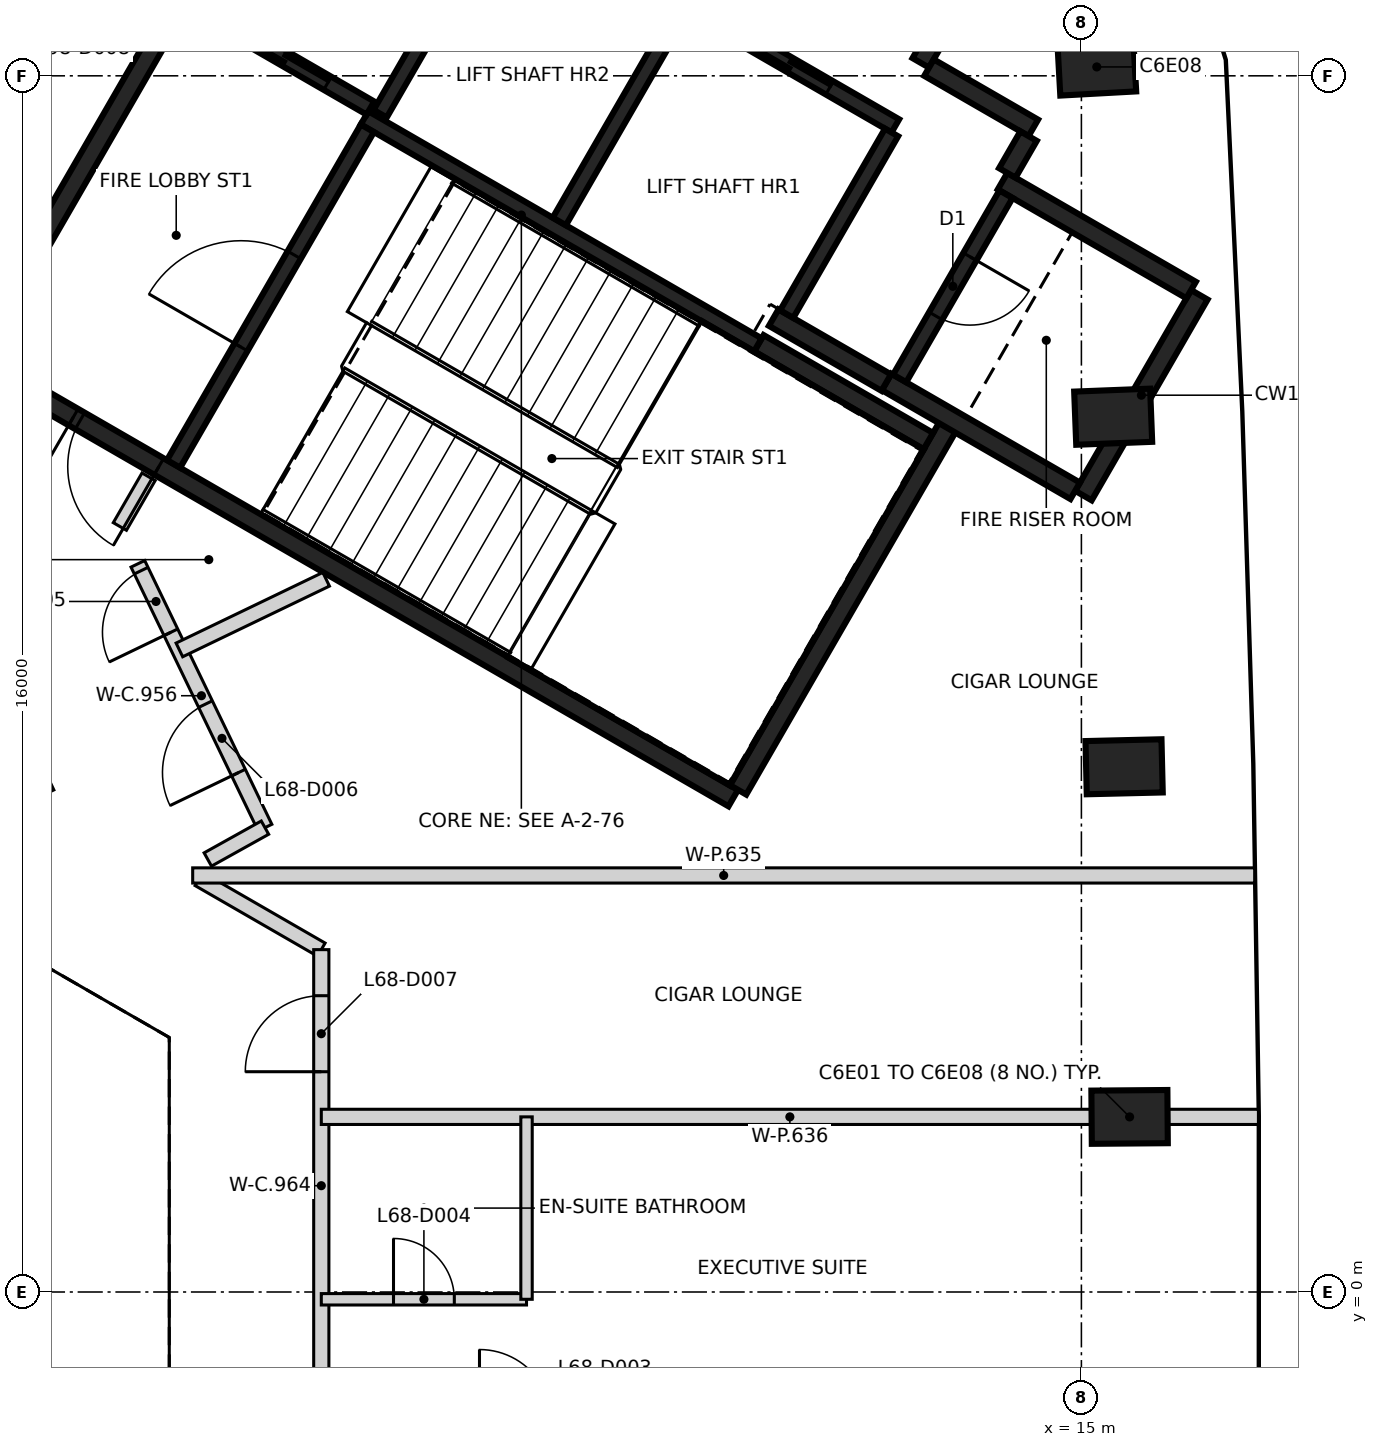
"""IFC4 building model, lengths in metres.
Left out: names, types, materials, properties, quantities, classifications, styles, units other than length and angle.
Written with IfcOpenShell. Run it as: python <this file> out.ifc"""

import sys

from ifc_helpers import new_model, si_unit, direction, frame, frame_2d, origin, origin_2d, place, context, subcontext, project, spatial, rectangle, extrude, element, fill, save


model = new_model("IFC4")
c1 = context("Model", 3, precision=1e-05, world=origin(), true_north=direction((0.0, 1.0)))
c2 = subcontext(c1, "Body", "Model", "MODEL_VIEW")
j1 = project(units=[si_unit("LENGTHUNIT", "METRE"), si_unit("PLANEANGLEUNIT", "RADIAN")], contexts=[c1])
p1 = place(None, origin())
s1 = spatial("IfcSite", under=j1, at=p1, CompositionType="ELEMENT")
p2 = place(p1, origin())
s2 = spatial("IfcBuilding", under=s1, at=p2, CompositionType="ELEMENT")
p3 = place(p2, frame((0.0, 0.0, 269.4)))
s3 = spatial("IfcBuildingStorey", under=s2, at=p3, CompositionType="ELEMENT", Elevation=269.4)
for number, where, z_axis, x_axis in (
    (1, (15.634, 2.303, -0.35), (0.0, 0.0, 1.0), (1.0, 0.008, 0.0)),
    (2, (15.562, 6.91, -0.35), (0.0, 0.0, 1.0), (1.0, 0.024, 0.0)),
    (3, (15.418, 11.515, -0.35), (0.0, 0.0, 1.0), (0.999, 0.039, 0.0)),
    (4, (15.202, 16.117, -0.35), (0.0, 0.0, 1.0), (0.998, 0.055, 0.0)),
):
    element("IfcColumn", number, at=place(p3, frame(where, z_axis=z_axis, x_axis=x_axis)), inside=s3, PredefinedType="COLUMN", context=c2, shape_type="SweptSolid", body=[
        extrude(rectangle(XDim=1.0, YDim=0.7, at=origin_2d()), origin(), (0.0, 0.0, 1.0), 3.6),
    ])
p4 = place(p3, frame((10.42, 6.498, 0.0), z_axis=(0.0, 0.0, 1.0), x_axis=(-0.866021906294, 0.500006057782, 0.0)))
e5 = element("IfcWall", 5, at=p4, inside=s3, PredefinedType="SHEAR", context=c2, shape_type="SweptSolid", body=[
    extrude(rectangle(XDim=11.55, YDim=0.25, at=frame_2d((5.775, 0.0))), origin(), (0.0, 0.0, 1.0), 3.25),
])
p5 = place(p4, frame((10.025, 0.0, 0.0)))
e6 = element("IfcOpeningElement", 6, at=p5, cuts=e5, PredefinedType="OPENING", context=c2, shape_type="SweptSolid", body=[
    extrude(rectangle(XDim=1.2, YDim=2.1, at=frame_2d((0.6, 1.05))), frame((0.0, 0.135, 0.0), z_axis=(0.0, -1.0, 0.0), x_axis=(1.0, 0.0, 0.0)), (0.0, 0.0, 1.0), 0.27),
])
p6 = place(p4, frame((8.725, 0.0, 0.0)))
e7 = element("IfcOpeningElement", 7, at=p6, cuts=e5, PredefinedType="OPENING", context=c2, shape_type="SweptSolid", body=[
    extrude(rectangle(XDim=1.2, YDim=2.1, at=frame_2d((0.6, 1.05))), frame((0.0, 0.135, 0.0), z_axis=(0.0, -1.0, 0.0), x_axis=(1.0, 0.0, 0.0)), (0.0, 0.0, 1.0), 0.27),
])
p7 = place(p3, frame((0.48, 12.381, 0.0), z_axis=(0.0, 0.0, 1.0), x_axis=(0.49999885962, 0.866026062182, 0.0)))
e8 = element("IfcWall", 8, at=p7, inside=s3, PredefinedType="SHEAR", context=c2, shape_type="SweptSolid", body=[
    extrude(rectangle(XDim=5.225, YDim=0.25, at=frame_2d((2.612, 0.0))), origin(), (0.0, 0.0, 1.0), 3.25),
])
p8 = place(p3, frame((13.238, 11.378, 0.0), z_axis=(0.0, 0.0, 1.0), x_axis=(-0.500008851346, -0.866020293397, 0.0)))
e9 = element("IfcWall", 9, at=p8, inside=s3, PredefinedType="SHEAR", context=c2, shape_type="SweptSolid", body=[
    extrude(rectangle(XDim=5.51, YDim=0.25, at=frame_2d((2.755, 0.0))), origin(), (0.0, 0.0, 1.0), 3.25),
])
p9 = place(p3, frame((16.552, 13.119, 0.0), z_axis=(0.0, 0.0, 1.0), x_axis=(-0.499978833458, -0.866037623948, 0.0)))
e10 = element("IfcWall", 10, at=p9, inside=s3, PredefinedType="SHEAR", context=c2, shape_type="SweptSolid", body=[
    extrude(rectangle(XDim=3.05, YDim=0.25, at=frame_2d((1.525, 0.0))), origin(), (0.0, 0.0, 1.0), 3.25),
])
p10 = place(p3, frame((14.918, 10.54, 0.0), z_axis=(0.0, 0.0, 1.0), x_axis=(-0.866063538972, 0.499933942099, 0.0)))
e11 = element("IfcWall", 11, at=p10, inside=s3, PredefinedType="SHEAR", context=c2, shape_type="SweptSolid", body=[
    extrude(rectangle(XDim=2.865, YDim=0.25, at=frame_2d((1.432, 0.0))), origin(), (0.0, 0.0, 1.0), 3.25),
])
p11 = place(p3, frame((13.963, 14.614, 0.0), z_axis=(0.0, 0.0, 1.0), x_axis=(0.866042235819, -0.499970844928, 0.0)))
e12 = element("IfcWall", 12, at=p11, inside=s3, PredefinedType="SHEAR", context=c2, shape_type="SweptSolid", body=[
    extrude(rectangle(XDim=2.865, YDim=0.25, at=frame_2d((1.432, 0.0))), origin(), (0.0, 0.0, 1.0), 3.25),
])
p12 = place(p3, frame((10.757, 12.481, 0.0), z_axis=(0.0, 0.0, 1.0), x_axis=(0.866022940537, -0.500004266446, 0.0)))
e13 = element("IfcWall", 13, at=p12, inside=s3, PredefinedType="SHEAR", context=c2, shape_type="SweptSolid", body=[
    extrude(rectangle(XDim=2.575, YDim=0.25, at=frame_2d((1.287, 0.0))), origin(), (0.0, 0.0, 1.0), 3.25),
])
p13 = place(p3, frame((13.819, 17.785, 0.0), z_axis=(0.0, 0.0, 1.0), x_axis=(-0.500039802285, -0.866002422705, 0.0)))
e14 = element("IfcWall", 14, at=p13, inside=s3, PredefinedType="SHEAR", context=c2, shape_type="SweptSolid", body=[
    extrude(rectangle(XDim=1.865, YDim=0.25, at=frame_2d((0.932, 0.0))), origin(), (0.0, 0.0, 1.0), 3.25),
])
p14 = place(p3, frame((12.433, 11.964, 0.0), z_axis=(0.0, 0.0, 1.0), x_axis=(-0.866038183914, 0.499977863513, 0.0)))
e15 = element("IfcWall", 15, at=p14, inside=s3, PredefinedType="SHEAR", context=c2, shape_type="SweptSolid", body=[
    extrude(rectangle(XDim=1.71, YDim=0.25, at=frame_2d((0.855, 0.0))), origin(), (0.0, 0.0, 1.0), 3.25),
])
p15 = place(p3, frame((12.995, 16.108, 0.0), z_axis=(0.0, 0.0, 1.0), x_axis=(0.866044474677, -0.49996696679, 0.0)))
e16 = element("IfcWall", 16, at=p15, inside=s3, PredefinedType="SHEAR", context=c2, shape_type="SweptSolid", body=[
    extrude(rectangle(XDim=1.584, YDim=0.25, at=frame_2d((0.792, 0.0))), origin(), (0.0, 0.0, 1.0), 3.25),
])
p16 = place(p3, frame((14.305, 15.207, 0.0), z_axis=(0.0, 0.0, 1.0), x_axis=(-0.499848422343, -0.866112899501, 0.0)))
e17 = element("IfcWall", 17, at=p16, inside=s3, PredefinedType="SHEAR", context=c2, shape_type="SweptSolid", body=[
    extrude(rectangle(XDim=0.559, YDim=0.25, at=frame_2d((0.28, 0.0))), origin(), (0.0, 0.0, 1.0), 3.25),
])
p17 = place(p3, frame((12.552, 15.342, 0.0), z_axis=(0.0, 0.0, 1.0), x_axis=(-0.866030299012, 0.499991521122, 0.0)))
e18 = element("IfcWall", 18, at=p17, inside=s3, PredefinedType="SHEAR", context=c2, shape_type="SweptSolid", body=[
    extrude(rectangle(XDim=6.1, YDim=0.2, at=frame_2d((3.05, 0.0))), origin(), (0.0, 0.0, 1.0), 3.25),
])
p18 = place(p17, frame((1.0, 0.0, 0.0)))
e19 = element("IfcOpeningElement", 19, at=p18, cuts=e18, PredefinedType="OPENING", context=c2, shape_type="SweptSolid", body=[
    extrude(rectangle(XDim=1.2, YDim=2.1, at=frame_2d((0.6, 1.05))), frame((0.0, 0.11, 0.0), z_axis=(0.0, -1.0, 0.0), x_axis=(1.0, 0.0, 0.0)), (0.0, 0.0, 1.0), 0.22),
])
p19 = place(p17, frame((3.982, 0.0, 0.0)))
e20 = element("IfcOpeningElement", 20, at=p19, cuts=e18, PredefinedType="OPENING", context=c2, shape_type="SweptSolid", body=[
    extrude(rectangle(XDim=1.2, YDim=2.1, at=frame_2d((0.6, 1.05))), frame((0.0, 0.11, 0.0), z_axis=(0.0, -1.0, 0.0), x_axis=(1.0, 0.0, 0.0)), (0.0, 0.0, 1.0), 0.22),
])
p20 = place(p3, frame((10.743, 12.46, 0.0), z_axis=(0.0, 0.0, 1.0), x_axis=(-0.866018848283, 0.500011354289, 0.0)))
e21 = element("IfcWall", 21, at=p20, inside=s3, PredefinedType="SHEAR", context=c2, shape_type="SweptSolid", body=[
    extrude(rectangle(XDim=5.974, YDim=0.2, at=frame_2d((2.987, 0.0))), origin(), (0.0, 0.0, 1.0), 3.25),
])
p21 = place(p3, frame((3.057, 10.895, 0.0), z_axis=(0.0, 0.0, 1.0), x_axis=(0.500027839223, 0.866009330205, 0.0)))
e22 = element("IfcWall", 22, at=p21, inside=s3, PredefinedType="SHEAR", context=c2, shape_type="SweptSolid", body=[
    extrude(rectangle(XDim=5.098, YDim=0.2, at=frame_2d((2.549, 0.0))), origin(), (0.0, 0.0, 1.0), 3.25),
])
p22 = place(p21, frame((1.774, 0.0, 0.0)))
e23 = element("IfcOpeningElement", 23, at=p22, cuts=e22, PredefinedType="OPENING", context=c2, shape_type="SweptSolid", body=[
    extrude(rectangle(XDim=1.4, YDim=2.1, at=frame_2d((0.7, 1.05))), frame((0.0, 0.11, 0.0), z_axis=(0.0, -1.0, 0.0), x_axis=(1.0, 0.0, 0.0)), (0.0, 0.0, 1.0), 0.22),
])
p23 = place(p3, frame((8.132, 14.084, 0.0), z_axis=(0.0, 0.0, 1.0), x_axis=(0.500030834389, 0.86600760081, 0.0)))
e24 = element("IfcWall", 24, at=p23, inside=s3, PredefinedType="SHEAR", context=c2, shape_type="SweptSolid", body=[
    extrude(rectangle(XDim=3.198, YDim=0.2, at=frame_2d((1.599, 0.0))), origin(), (0.0, 0.0, 1.0), 3.25),
])
p24 = place(p3, frame((14.008, 14.442, 0.0), z_axis=(0.0, 0.0, 1.0), x_axis=(-0.499986818241, -0.866033014143, 0.0)))
e25 = element("IfcWall", 25, at=p24, inside=s3, PredefinedType="SHEAR", context=c2, shape_type="SweptSolid", body=[
    extrude(rectangle(XDim=2.798, YDim=0.2, at=frame_2d((1.399, 0.0))), origin(), (0.0, 0.0, 1.0), 3.25),
])
p25 = place(p24, frame((0.949, 0.0, 0.0)))
e26 = element("IfcOpeningElement", 26, at=p25, cuts=e25, PredefinedType="OPENING", context=c2, shape_type="SweptSolid", body=[
    extrude(rectangle(XDim=0.9, YDim=2.1, at=frame_2d((0.45, 1.05))), frame((0.0, 0.11, 0.0), z_axis=(0.0, -1.0, 0.0), x_axis=(1.0, 0.0, 0.0)), (0.0, 0.0, 1.0), 0.22),
])
p26 = place(p3, frame((12.502, 15.255, 0.0), z_axis=(0.0, 0.0, 1.0), x_axis=(-0.499965018551, -0.866045599391, 0.0)))
e27 = element("IfcWall", 27, at=p26, inside=s3, PredefinedType="SHEAR", context=c2, shape_type="SweptSolid", body=[
    extrude(rectangle(XDim=2.759, YDim=0.2, at=frame_2d((1.379, 0.0))), origin(), (0.0, 0.0, 1.0), 3.25),
])
p27 = place(p3, frame((7.324, 18.187, 0.0), z_axis=(0.0, 0.0, 1.0), x_axis=(-0.499967891604, -0.866043940782, 0.0)))
e28 = element("IfcWall", 28, at=p27, inside=s3, PredefinedType="SHEAR", context=c2, shape_type="SweptSolid", body=[
    extrude(rectangle(XDim=3.1, YDim=0.2, at=frame_2d((1.55, 0.0))), origin(), (0.0, 0.0, 1.0), 3.25),
])
p28 = place(p3, frame((5.646, 15.576, 0.0), z_axis=(0.0, 0.0, 1.0), x_axis=(-0.866018407898, 0.500012117035, 0.0)))
e29 = element("IfcWall", 29, at=p28, inside=s3, PredefinedType="SHEAR", context=c2, shape_type="SweptSolid", body=[
    extrude(rectangle(XDim=2.651, YDim=0.2, at=frame_2d((1.325, 0.0))), origin(), (0.0, 0.0, 1.0), 3.25),
])
p29 = place(p28, frame((0.652, 0.0, 0.0)))
e30 = element("IfcOpeningElement", 30, at=p29, cuts=e29, PredefinedType="OPENING", context=c2, shape_type="SweptSolid", body=[
    extrude(rectangle(XDim=1.3, YDim=2.1, at=frame_2d((0.65, 1.05))), frame((0.0, 0.11, 0.0), z_axis=(0.0, -1.0, 0.0), x_axis=(1.0, 0.0, 0.0)), (0.0, 0.0, 1.0), 0.22),
])
p30 = place(p3, frame((-1.06, 11.76, 0.0), z_axis=(0.0, 0.0, 1.0), x_axis=(0.426549824954, -0.904464066081, 0.0)))
e31 = element("IfcWall", 31, at=p30, inside=s3, PredefinedType="PARTITIONING", context=c2, shape_type="SweptSolid", body=[
    extrude(rectangle(XDim=5.747, YDim=0.2, at=frame_2d((2.873, 0.0))), origin(), (0.0, 0.0, 1.0), 3.25),
])
p31 = place(p3, frame((-1.027, 12.757, 0.0), z_axis=(0.0, 0.0, 1.0), x_axis=(0.492663063759, 0.870220147783, 0.0)))
e32 = element("IfcWall", 32, at=p31, inside=s3, PredefinedType="PARTITIONING", context=c2, shape_type="SweptSolid", body=[
    extrude(rectangle(XDim=6.187, YDim=0.2, at=frame_2d((3.094, 0.0))), origin(), (0.0, 0.0, 1.0), 3.25),
])
p32 = place(p31, frame((2.65, 0.0, 0.0)))
e33 = element("IfcOpeningElement", 33, at=p32, cuts=e32, PredefinedType="OPENING", context=c2, shape_type="SweptSolid", body=[
    extrude(rectangle(XDim=0.95, YDim=2.1, at=frame_2d((0.475, 1.05))), frame((0.0, 0.11, 0.0), z_axis=(0.0, -1.0, 0.0), x_axis=(1.0, 0.0, 0.0)), (0.0, 0.0, 1.0), 0.22),
])
p33 = place(p3, frame((2.35, 10.071, 0.0), z_axis=(0.0, 0.0, 1.0), x_axis=(0.500309905322, 0.865846405916, 0.0)))
e34 = element("IfcWall", 34, at=p33, inside=s3, PredefinedType="PARTITIONING", context=c2, shape_type="SweptSolid", body=[
    extrude(rectangle(XDim=0.755, YDim=0.2, at=frame_2d((0.378, 0.0))), origin(), (0.0, 0.0, 1.0), 3.25),
])
p34 = place(p3, frame((4.26, 6.109, 0.0), z_axis=(0.0, 0.0, 1.0), x_axis=(-0.434189007872, 0.900821794498, 0.0)))
e35 = element("IfcWall", 35, at=p34, inside=s3, PredefinedType="PARTITIONING", context=c2, shape_type="SweptSolid", body=[
    extrude(rectangle(XDim=3.853, YDim=0.2, at=frame_2d((1.926, 0.0))), origin(), (0.0, 0.0, 1.0), 3.25),
])
p35 = place(p34, frame((2.853, 0.0, 0.0)))
e36 = element("IfcOpeningElement", 36, at=p35, cuts=e35, PredefinedType="OPENING", context=c2, shape_type="SweptSolid", body=[
    extrude(rectangle(XDim=0.9, YDim=2.1, at=frame_2d((0.45, 1.05))), frame((0.0, 0.11, 0.0), z_axis=(0.0, -1.0, 0.0), x_axis=(1.0, 0.0, 0.0)), (0.0, 0.0, 1.0), 0.22),
])
p36 = place(p34, frame((0.804, 0.0, 0.0)))
e37 = element("IfcOpeningElement", 37, at=p36, cuts=e35, PredefinedType="OPENING", context=c2, shape_type="SweptSolid", body=[
    extrude(rectangle(XDim=1.0, YDim=2.1, at=frame_2d((0.5, 1.05))), frame((0.0, 0.11, 0.0), z_axis=(0.0, -1.0, 0.0), x_axis=(1.0, 0.0, 0.0)), (0.0, 0.0, 1.0), 0.22),
])
p37 = place(p3, frame((3.39, 5.433, 0.0), z_axis=(0.0, 0.0, 1.0), x_axis=(0.866117799835, -0.499839931186, 0.0)))
e38 = element("IfcWall", 38, at=p37, inside=s3, PredefinedType="PARTITIONING", context=c2, shape_type="SweptSolid", body=[
    extrude(rectangle(XDim=1.859, YDim=0.2, at=frame_2d((0.929, 0.0))), origin(), (0.0, 0.0, 1.0), 3.25),
])
p38 = place(p3, frame((3.507, 5.69, 0.0), z_axis=(0.0, 0.0, 1.0), x_axis=(0.873567976284, 0.486702158215, 0.0)))
e39 = element("IfcWall", 39, at=p38, inside=s3, PredefinedType="PARTITIONING", context=c2, shape_type="SweptSolid", body=[
    extrude(rectangle(XDim=0.861, YDim=0.2, at=frame_2d((0.43, 0.0))), origin(), (0.0, 0.0, 1.0), 3.25),
])
p39 = place(p3, frame((5.0, -1.707, 0.0), z_axis=(0.0, 0.0, 1.0), x_axis=(0.0, 1.0, 0.0)))
e40 = element("IfcWall", 40, at=p39, inside=s3, PredefinedType="PARTITIONING", context=c2, shape_type="SweptSolid", body=[
    extrude(rectangle(XDim=6.211, YDim=0.2, at=frame_2d((3.105, 0.0))), origin(), (0.0, 0.0, 1.0), 3.25),
])
p40 = place(p39, frame((4.605, 0.0, 0.0)))
e41 = element("IfcOpeningElement", 41, at=p40, cuts=e40, PredefinedType="OPENING", context=c2, shape_type="SweptSolid", body=[
    extrude(rectangle(XDim=1.0, YDim=2.1, at=frame_2d((0.5, 1.05))), frame((0.0, 0.11, 0.0), z_axis=(0.0, -1.0, 0.0), x_axis=(1.0, 0.0, 0.0)), (0.0, 0.0, 1.0), 0.22),
])
p41 = place(p3, frame((3.133, 8.447, 0.0), z_axis=(0.0, 0.0, 1.0), x_axis=(0.900981876458, 0.433856725538, 0.0)))
e42 = element("IfcWall", 42, at=p41, inside=s3, PredefinedType="PARTITIONING", context=c2, shape_type="SweptSolid", body=[
    extrude(rectangle(XDim=2.143, YDim=0.2, at=frame_2d((1.071, 0.0))), origin(), (0.0, 0.0, 1.0), 3.25),
])
p42 = place(p3, frame((3.308, 5.48, 0.0), z_axis=(0.0, 0.0, 1.0), x_axis=(1.0, 0.0, 0.0)))
e43 = element("IfcWall", 43, at=p42, inside=s3, PredefinedType="PARTITIONING", context=c2, shape_type="SweptSolid", body=[
    extrude(rectangle(XDim=13.971, YDim=0.2, at=frame_2d((6.986, 0.0))), origin(), (0.0, 0.0, 1.0), 2.35),
])
p43 = place(p3, frame((5.0, 2.304, 0.0), z_axis=(0.0, 0.0, 1.0), x_axis=(1.0, 0.0, 0.0)))
e44 = element("IfcWall", 44, at=p43, inside=s3, PredefinedType="PARTITIONING", context=c2, shape_type="SweptSolid", body=[
    extrude(rectangle(XDim=12.329, YDim=0.2, at=frame_2d((6.165, 0.0))), origin(), (0.0, 0.0, 1.0), 3.25),
])
p44 = place(p3, frame((5.0, -0.096, 0.0), z_axis=(0.0, 0.0, 1.0), x_axis=(1.0, 0.0, 0.0)))
e45 = element("IfcWall", 45, at=p44, inside=s3, PredefinedType="PARTITIONING", context=c2, shape_type="SweptSolid", body=[
    extrude(rectangle(XDim=2.7, YDim=0.15, at=frame_2d((1.35, 0.0))), origin(), (0.0, 0.0, 1.0), 3.25),
])
p45 = place(p44, frame((0.95, 0.0, 0.0)))
e46 = element("IfcOpeningElement", 46, at=p45, cuts=e45, PredefinedType="OPENING", context=c2, shape_type="SweptSolid", body=[
    extrude(rectangle(XDim=0.8, YDim=2.1, at=frame_2d((0.4, 1.05))), frame((0.0, 0.085, 0.0), z_axis=(0.0, -1.0, 0.0), x_axis=(1.0, 0.0, 0.0)), (0.0, 0.0, 1.0), 0.17),
])
p46 = place(p3, frame((7.7, -0.096, 0.0), z_axis=(0.0, 0.0, 1.0), x_axis=(0.0, 1.0, 0.0)))
e47 = element("IfcWall", 47, at=p46, inside=s3, PredefinedType="PARTITIONING", context=c2, shape_type="SweptSolid", body=[
    extrude(rectangle(XDim=2.4, YDim=0.15, at=frame_2d((1.2, 0.0))), origin(), (0.0, 0.0, 1.0), 3.25),
])
p47 = place(p29, origin())
e48 = element("IfcDoor", 48, at=p47, inside=s3, OperationType="SLIDING_TO_LEFT", PredefinedType="DOOR", context=c2, shape_type="SweptSolid", body=[
    extrude(rectangle(XDim=1.3, YDim=2.1, at=frame_2d((0.65, 1.05))), frame((0.0, 0.025, 0.0), z_axis=(0.0, -1.0, 0.0), x_axis=(1.0, 0.0, 0.0)), (0.0, 0.0, 1.0), 0.05),
])
fill(e30, e48)
p48 = place(p18, origin())
e49 = element("IfcDoor", 49, at=p48, inside=s3, OperationType="DOUBLE_DOOR_SLIDING", PredefinedType="DOOR", context=c2, shape_type="SweptSolid", body=[
    extrude(rectangle(XDim=1.2, YDim=2.1, at=frame_2d((0.6, 1.05))), frame((0.0, 0.025, 0.0), z_axis=(0.0, -1.0, 0.0), x_axis=(1.0, 0.0, 0.0)), (0.0, 0.0, 1.0), 0.05),
])
fill(e19, e49)
p49 = place(p5, origin())
e50 = element("IfcDoor", 50, at=p49, inside=s3, OperationType="SINGLE_SWING_LEFT", PredefinedType="DOOR", context=c2, shape_type="SweptSolid", body=[
    extrude(rectangle(XDim=1.2, YDim=2.1, at=frame_2d((0.6, 1.05))), frame((0.0, 0.025, 0.0), z_axis=(0.0, -1.0, 0.0), x_axis=(1.0, 0.0, 0.0)), (0.0, 0.0, 1.0), 0.05),
])
fill(e6, e50)
p50 = place(p6, origin())
e51 = element("IfcDoor", 51, at=p50, inside=s3, OperationType="SINGLE_SWING_RIGHT", PredefinedType="DOOR", context=c2, shape_type="SweptSolid", body=[
    extrude(rectangle(XDim=1.2, YDim=2.1, at=frame_2d((0.6, 1.05))), frame((0.0, 0.025, 0.0), z_axis=(0.0, -1.0, 0.0), x_axis=(1.0, 0.0, 0.0)), (0.0, 0.0, 1.0), 0.05),
])
fill(e7, e51)
p51 = place(p22, origin())
e52 = element("IfcDoor", 52, at=p51, inside=s3, OperationType="SINGLE_SWING_LEFT", PredefinedType="DOOR", context=c2, shape_type="SweptSolid", body=[
    extrude(rectangle(XDim=1.4, YDim=2.1, at=frame_2d((0.7, 1.05))), frame((0.0, 0.025, 0.0), z_axis=(0.0, -1.0, 0.0), x_axis=(1.0, 0.0, 0.0)), (0.0, 0.0, 1.0), 0.05),
])
fill(e23, e52)
p52 = place(p25, origin())
e53 = element("IfcDoor", 53, at=p52, inside=s3, OperationType="SINGLE_SWING_RIGHT", PredefinedType="DOOR", context=c2, shape_type="SweptSolid", body=[
    extrude(rectangle(XDim=0.9, YDim=2.1, at=frame_2d((0.45, 1.05))), frame((0.0, 0.025, 0.0), z_axis=(0.0, -1.0, 0.0), x_axis=(1.0, 0.0, 0.0)), (0.0, 0.0, 1.0), 0.05),
])
fill(e26, e53)
p53 = place(p45, origin())
e54 = element("IfcDoor", 54, at=p53, inside=s3, OperationType="SINGLE_SWING_LEFT", PredefinedType="DOOR", context=c2, shape_type="SweptSolid", body=[
    extrude(rectangle(XDim=0.8, YDim=2.1, at=frame_2d((0.4, 1.05))), frame((0.0, 0.025, 0.0), z_axis=(0.0, -1.0, 0.0), x_axis=(1.0, 0.0, 0.0)), (0.0, 0.0, 1.0), 0.05),
])
fill(e46, e54)
p54 = place(p35, origin())
e55 = element("IfcDoor", 55, at=p54, inside=s3, OperationType="SINGLE_SWING_LEFT", PredefinedType="DOOR", context=c2, shape_type="SweptSolid", body=[
    extrude(rectangle(XDim=0.9, YDim=2.1, at=frame_2d((0.45, 1.05))), frame((0.0, 0.025, 0.0), z_axis=(0.0, -1.0, 0.0), x_axis=(1.0, 0.0, 0.0)), (0.0, 0.0, 1.0), 0.05),
])
fill(e36, e55)
p55 = place(p36, origin())
e56 = element("IfcDoor", 56, at=p55, inside=s3, OperationType="SINGLE_SWING_LEFT", PredefinedType="DOOR", context=c2, shape_type="SweptSolid", body=[
    extrude(rectangle(XDim=1.0, YDim=2.1, at=frame_2d((0.5, 1.05))), frame((0.0, 0.025, 0.0), z_axis=(0.0, -1.0, 0.0), x_axis=(1.0, 0.0, 0.0)), (0.0, 0.0, 1.0), 0.05),
])
fill(e37, e56)
p56 = place(p40, frame((1.0, 0.0, 0.0), z_axis=(0.0, 0.0, 1.0), x_axis=(-1.0, 0.0, 0.0)))
e57 = element("IfcDoor", 57, at=p56, inside=s3, OperationType="SINGLE_SWING_LEFT", PredefinedType="DOOR", context=c2, shape_type="SweptSolid", body=[
    extrude(rectangle(XDim=1.0, YDim=2.1, at=frame_2d((0.5, 1.05))), frame((0.0, 0.025, 0.0), z_axis=(0.0, -1.0, 0.0), x_axis=(1.0, 0.0, 0.0)), (0.0, 0.0, 1.0), 0.05),
])
fill(e41, e57)
save(model, sys.argv[1])
